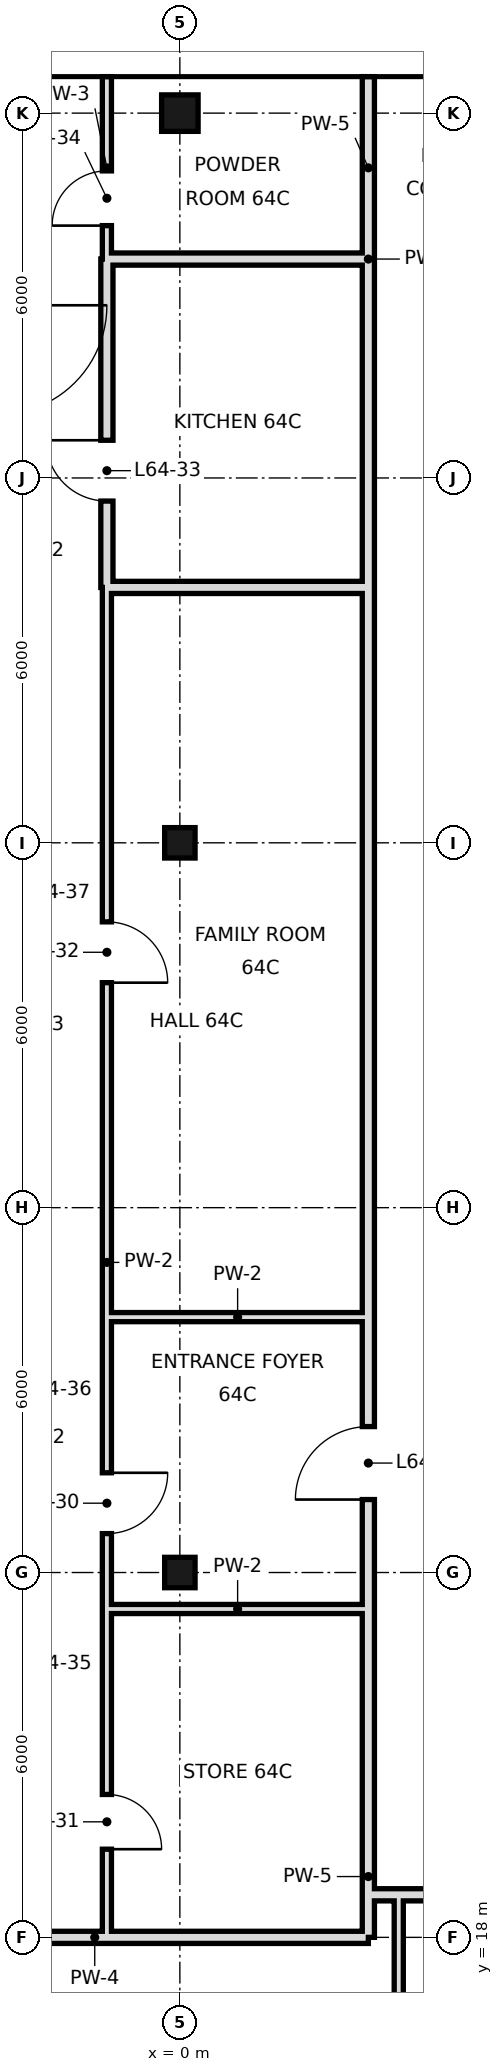
"""IFC4 building model, lengths in metres.
Left out: names, types, materials, properties, quantities, classifications, styles, units other than length and angle.
Written with IfcOpenShell. Run it as: python <this file> out.ifc"""

import sys

from ifc_helpers import new_model, si_unit, direction, frame, frame_2d, origin, origin_2d, place, context, subcontext, project, spatial, rectangle, hollow_rectangle, extrude, element, fill, save


model = new_model("IFC4")
c1 = context("Model", 3, precision=1e-05, world=origin(), true_north=direction((0.0, 1.0)))
c2 = subcontext(c1, "Body", "Model", "MODEL_VIEW")
j1 = project(units=[si_unit("LENGTHUNIT", "METRE"), si_unit("PLANEANGLEUNIT", "RADIAN")], contexts=[c1])
p1 = place(None, origin())
s1 = spatial("IfcSite", under=j1, at=p1, CompositionType="ELEMENT")
p2 = place(p1, origin())
s2 = spatial("IfcBuilding", under=s1, at=p2, CompositionType="ELEMENT")
p3 = place(p2, frame((0.0, 0.0, 270.2)))
s3 = spatial("IfcBuildingStorey", under=s2, at=p3, CompositionType="ELEMENT", Elevation=270.2)
for number, where, z_axis, x_axis in (
    (1, (0.0, 24.0, 0.0), (0.0, 0.0, 1.0), (1.0, 0.0, 0.0)),
    (2, (0.0, 36.0, 0.0), (0.0, 0.0, 1.0), (1.0, 0.0, 0.0)),
):
    element("IfcColumn", number, at=place(p3, frame(where, z_axis=z_axis, x_axis=x_axis)), inside=s3, PredefinedType="COLUMN", context=c2, shape_type="SweptSolid", body=[
        extrude(hollow_rectangle(XDim=0.5, YDim=0.5, WallThickness=0.025, at=origin_2d()), origin(), (0.0, 0.0, 1.0), 3.6),
    ])
p4 = place(p3, frame((0.0, 48.0, 0.0), z_axis=(0.0, 0.0, 1.0), x_axis=(1.0, 0.0, 0.0)))
e3 = element("IfcColumn", 3, at=p4, inside=s3, PredefinedType="COLUMN", context=c2, shape_type="SweptSolid", body=[
    extrude(hollow_rectangle(XDim=0.6, YDim=0.6, WallThickness=0.028, at=origin_2d()), origin(), (0.0, 0.0, 1.0), 3.6),
])
p5 = place(p3, frame((-1.2, 40.2, 0.0), z_axis=(0.0, 0.0, 1.0), x_axis=(0.0, 1.0, 0.0)))
e4 = element("IfcWall", 4, at=p5, inside=s3, PredefinedType="SOLIDWALL", context=c2, shape_type="SweptSolid", body=[
    extrude(rectangle(XDim=5.4, YDim=0.2, at=frame_2d((2.7, 0.0))), origin(), (0.0, 0.0, 1.0), 2.72),
])
p6 = place(p5, frame((1.42, 0.0, 0.0)))
e5 = element("IfcOpeningElement", 5, at=p6, cuts=e4, PredefinedType="OPENING", context=c2, shape_type="SweptSolid", body=[
    extrude(rectangle(XDim=1.0, YDim=2.4, at=frame_2d((0.5, 1.2))), frame((0.0, 0.11, 0.0), z_axis=(0.0, -1.0, 0.0), x_axis=(1.0, 0.0, 0.0)), (0.0, 0.0, 1.0), 0.22),
])
p7 = place(p3, frame((-1.2, 18.0, 0.0), z_axis=(0.0, 0.0, 1.0), x_axis=(0.0, 1.0, 0.0)))
e6 = element("IfcWall", 6, at=p7, inside=s3, PredefinedType="PARTITIONING", context=c2, shape_type="SweptSolid", body=[
    extrude(rectangle(XDim=22.2, YDim=0.15, at=frame_2d((11.1, 0.0))), origin(), (0.0, 0.0, 1.0), 3.42),
])
p8 = place(p7, frame((6.64, 0.0, 0.0)))
e7 = element("IfcOpeningElement", 7, at=p8, cuts=e6, PredefinedType="OPENING", context=c2, shape_type="SweptSolid", body=[
    extrude(rectangle(XDim=1.0, YDim=2.4, at=frame_2d((0.5, 1.2))), frame((0.0, 0.085, 0.0), z_axis=(0.0, -1.0, 0.0), x_axis=(1.0, 0.0, 0.0)), (0.0, 0.0, 1.0), 0.17),
])
p9 = place(p7, frame((1.45, 0.0, 0.0)))
e8 = element("IfcOpeningElement", 8, at=p9, cuts=e6, PredefinedType="OPENING", context=c2, shape_type="SweptSolid", body=[
    extrude(rectangle(XDim=0.9, YDim=2.1, at=frame_2d((0.45, 1.05))), frame((0.0, 0.085, 0.0), z_axis=(0.0, -1.0, 0.0), x_axis=(1.0, 0.0, 0.0)), (0.0, 0.0, 1.0), 0.17),
])
p10 = place(p7, frame((15.7, 0.0, 0.0)))
e9 = element("IfcOpeningElement", 9, at=p10, cuts=e6, PredefinedType="OPENING", context=c2, shape_type="SweptSolid", body=[
    extrude(rectangle(XDim=1.0, YDim=2.4, at=frame_2d((0.5, 1.2))), frame((0.0, 0.085, 0.0), z_axis=(0.0, -1.0, 0.0), x_axis=(1.0, 0.0, 0.0)), (0.0, 0.0, 1.0), 0.17),
])
p11 = place(p3, frame((-1.2, 45.6, 0.0), z_axis=(0.0, 0.0, 1.0), x_axis=(0.0, 1.0, 0.0)))
e10 = element("IfcWall", 10, at=p11, inside=s3, PredefinedType="PARTITIONING", context=c2, shape_type="SweptSolid", body=[
    extrude(rectangle(XDim=3.0, YDim=0.15, at=frame_2d((1.5, 0.0))), origin(), (0.0, 0.0, 1.0), 3.42),
])
p12 = place(p11, frame((0.55, 0.0, 0.0)))
e11 = element("IfcOpeningElement", 11, at=p12, cuts=e10, PredefinedType="OPENING", context=c2, shape_type="SweptSolid", body=[
    extrude(rectangle(XDim=0.9, YDim=2.4, at=frame_2d((0.45, 1.2))), frame((0.0, 0.085, 0.0), z_axis=(0.0, -1.0, 0.0), x_axis=(1.0, 0.0, 0.0)), (0.0, 0.0, 1.0), 0.17),
])
p13 = place(p3, frame((3.1, 18.7, 0.0), z_axis=(0.0, 0.0, 1.0), x_axis=(0.0, 1.0, 0.0)))
e12 = element("IfcWall", 12, at=p13, inside=s3, PredefinedType="SOLIDWALL", context=c2, shape_type="SweptSolid", body=[
    extrude(rectangle(XDim=21.5, YDim=0.2, at=frame_2d((10.75, 0.0))), origin(), (0.0, 0.0, 1.0), 2.97),
])
p14 = place(p13, frame((6.5, 0.0, 0.0)))
e13 = element("IfcOpeningElement", 13, at=p14, cuts=e12, PredefinedType="OPENING", context=c2, shape_type="SweptSolid", body=[
    extrude(rectangle(XDim=1.2, YDim=2.4, at=frame_2d((0.6, 1.2))), frame((0.0, 0.11, 0.0), z_axis=(0.0, -1.0, 0.0), x_axis=(1.0, 0.0, 0.0)), (0.0, 0.0, 1.0), 0.22),
])
p15 = place(p3, frame((3.1, 45.6, 0.0), z_axis=(0.0, 0.0, 1.0), x_axis=(0.0, 1.0, 0.0)))
e14 = element("IfcWall", 14, at=p15, inside=s3, PredefinedType="SOLIDWALL", context=c2, shape_type="SweptSolid", body=[
    extrude(rectangle(XDim=3.0, YDim=0.2, at=frame_2d((1.5, 0.0))), origin(), (0.0, 0.0, 1.0), 2.72),
])
p16 = place(p3, frame((3.1, 40.2, 0.0), z_axis=(0.0, 0.0, 1.0), x_axis=(0.0, 1.0, 0.0)))
e15 = element("IfcWall", 15, at=p16, inside=s3, PredefinedType="SOLIDWALL", context=c2, shape_type="SweptSolid", body=[
    extrude(rectangle(XDim=5.4, YDim=0.2, at=frame_2d((2.7, 0.0))), origin(), (0.0, 0.0, 1.0), 2.97),
])
p17 = place(p3, frame((3.1, 18.0, 0.0), z_axis=(0.0, 0.0, 1.0), x_axis=(0.0, 1.0, 0.0)))
e16 = element("IfcWall", 16, at=p17, inside=s3, PredefinedType="SOLIDWALL", context=c2, shape_type="SweptSolid", body=[
    extrude(rectangle(XDim=0.7, YDim=0.2, at=frame_2d((0.35, 0.0))), origin(), (0.0, 0.0, 1.0), 2.97),
])
p18 = place(p3, frame((3.6, 10.8, 0.0), z_axis=(0.0, 0.0, 1.0), x_axis=(0.0, 1.0, 0.0)))
e17 = element("IfcWall", 17, at=p18, inside=s3, PredefinedType="PARTITIONING", context=c2, shape_type="SweptSolid", body=[
    extrude(rectangle(XDim=7.9, YDim=0.15, at=frame_2d((3.95, 0.0))), origin(), (0.0, 0.0, 1.0), 3.42),
])
p19 = place(p3, frame((-6.6, 18.0, 0.0), z_axis=(0.0, 0.0, 1.0), x_axis=(1.0, 0.0, 0.0)))
e18 = element("IfcWall", 18, at=p19, inside=s3, PredefinedType="SOLIDWALL", context=c2, shape_type="SweptSolid", body=[
    extrude(rectangle(XDim=9.7, YDim=0.2, at=frame_2d((4.85, 0.0))), origin(), (0.0, 0.0, 1.0), 2.72),
])
p20 = place(p3, frame((3.1, 18.7, 0.0), z_axis=(0.0, 0.0, 1.0), x_axis=(1.0, 0.0, 0.0)))
e19 = element("IfcWall", 19, at=p20, inside=s3, PredefinedType="SOLIDWALL", context=c2, shape_type="SweptSolid", body=[
    extrude(rectangle(XDim=20.9, YDim=0.2, at=frame_2d((10.45, 0.0))), origin(), (0.0, 0.0, 1.0), 2.72),
])
p21 = place(p20, frame((14.9, 0.0, 0.0)))
e20 = element("IfcOpeningElement", 20, at=p21, cuts=e19, PredefinedType="OPENING", context=c2, shape_type="SweptSolid", body=[
    extrude(rectangle(XDim=1.2, YDim=2.4, at=frame_2d((0.6, 1.2))), frame((0.0, 0.11, 0.0), z_axis=(0.0, -1.0, 0.0), x_axis=(1.0, 0.0, 0.0)), (0.0, 0.0, 1.0), 0.22),
])
for number, where, z_axis, x_axis in (
    (21, (-1.2, 23.4, 0.0), (0.0, 0.0, 1.0), (1.0, 0.0, 0.0)),
    (22, (-1.2, 28.2, 0.0), (0.0, 0.0, 1.0), (1.0, 0.0, 0.0)),
):
    element("IfcWall", number, at=place(p3, frame(where, z_axis=z_axis, x_axis=x_axis)), inside=s3, PredefinedType="PARTITIONING", context=c2, shape_type="SweptSolid", body=[
        extrude(rectangle(XDim=4.3, YDim=0.15, at=frame_2d((2.15, 0.0))), origin(), (0.0, 0.0, 1.0), 3.42),
    ])
for number, where, z_axis, x_axis in (
    (23, (-1.2, 40.2, 0.0), (0.0, 0.0, 1.0), (1.0, 0.0, 0.0)),
    (24, (-1.2, 45.6, 0.0), (0.0, 0.0, 1.0), (1.0, 0.0, 0.0)),
):
    element("IfcWall", number, at=place(p3, frame(where, z_axis=z_axis, x_axis=x_axis)), inside=s3, PredefinedType="SOLIDWALL", context=c2, shape_type="SweptSolid", body=[
        extrude(rectangle(XDim=4.3, YDim=0.2, at=frame_2d((2.15, 0.0))), origin(), (0.0, 0.0, 1.0), 2.72),
    ])
p22 = place(p8, origin())
e25 = element("IfcDoor", 25, at=p22, inside=s3, OperationType="SINGLE_SWING_RIGHT", PredefinedType="DOOR", context=c2, shape_type="SweptSolid", body=[
    extrude(rectangle(XDim=1.0, YDim=2.4, at=frame_2d((0.5, 1.2))), frame((0.0, 0.025, 0.0), z_axis=(0.0, -1.0, 0.0), x_axis=(1.0, 0.0, 0.0)), (0.0, 0.0, 1.0), 0.05),
])
fill(e7, e25)
p23 = place(p9, frame((0.9, 0.0, 0.0), z_axis=(0.0, 0.0, 1.0), x_axis=(-1.0, 0.0, 0.0)))
e26 = element("IfcDoor", 26, at=p23, inside=s3, OperationType="SINGLE_SWING_RIGHT", PredefinedType="DOOR", context=c2, shape_type="SweptSolid", body=[
    extrude(rectangle(XDim=0.9, YDim=2.1, at=frame_2d((0.45, 1.05))), frame((0.0, 0.025, 0.0), z_axis=(0.0, -1.0, 0.0), x_axis=(1.0, 0.0, 0.0)), (0.0, 0.0, 1.0), 0.05),
])
fill(e8, e26)
p24 = place(p10, frame((1.0, 0.0, 0.0), z_axis=(0.0, 0.0, 1.0), x_axis=(-1.0, 0.0, 0.0)))
e27 = element("IfcDoor", 27, at=p24, inside=s3, OperationType="SINGLE_SWING_RIGHT", PredefinedType="DOOR", context=c2, shape_type="SweptSolid", body=[
    extrude(rectangle(XDim=1.0, YDim=2.4, at=frame_2d((0.5, 1.2))), frame((0.0, 0.025, 0.0), z_axis=(0.0, -1.0, 0.0), x_axis=(1.0, 0.0, 0.0)), (0.0, 0.0, 1.0), 0.05),
])
fill(e9, e27)
p25 = place(p6, frame((1.0, 0.0, 0.0), z_axis=(0.0, 0.0, 1.0), x_axis=(-1.0, 0.0, 0.0)))
e28 = element("IfcDoor", 28, at=p25, inside=s3, OperationType="SINGLE_SWING_LEFT", PredefinedType="DOOR", context=c2, shape_type="SweptSolid", body=[
    extrude(rectangle(XDim=1.0, YDim=2.4, at=frame_2d((0.5, 1.2))), frame((0.0, 0.025, 0.0), z_axis=(0.0, -1.0, 0.0), x_axis=(1.0, 0.0, 0.0)), (0.0, 0.0, 1.0), 0.05),
])
fill(e5, e28)
p26 = place(p12, origin())
e29 = element("IfcDoor", 29, at=p26, inside=s3, OperationType="SINGLE_SWING_LEFT", PredefinedType="DOOR", context=c2, shape_type="SweptSolid", body=[
    extrude(rectangle(XDim=0.9, YDim=2.4, at=frame_2d((0.45, 1.2))), frame((0.0, 0.025, 0.0), z_axis=(0.0, -1.0, 0.0), x_axis=(1.0, 0.0, 0.0)), (0.0, 0.0, 1.0), 0.05),
])
fill(e11, e29)
p27 = place(p14, origin())
e30 = element("IfcDoor", 30, at=p27, inside=s3, OperationType="SINGLE_SWING_LEFT", PredefinedType="DOOR", context=c2, shape_type="SweptSolid", body=[
    extrude(rectangle(XDim=1.2, YDim=2.4, at=frame_2d((0.6, 1.2))), frame((0.0, 0.025, 0.0), z_axis=(0.0, -1.0, 0.0), x_axis=(1.0, 0.0, 0.0)), (0.0, 0.0, 1.0), 0.05),
])
fill(e13, e30)
save(model, sys.argv[1])
